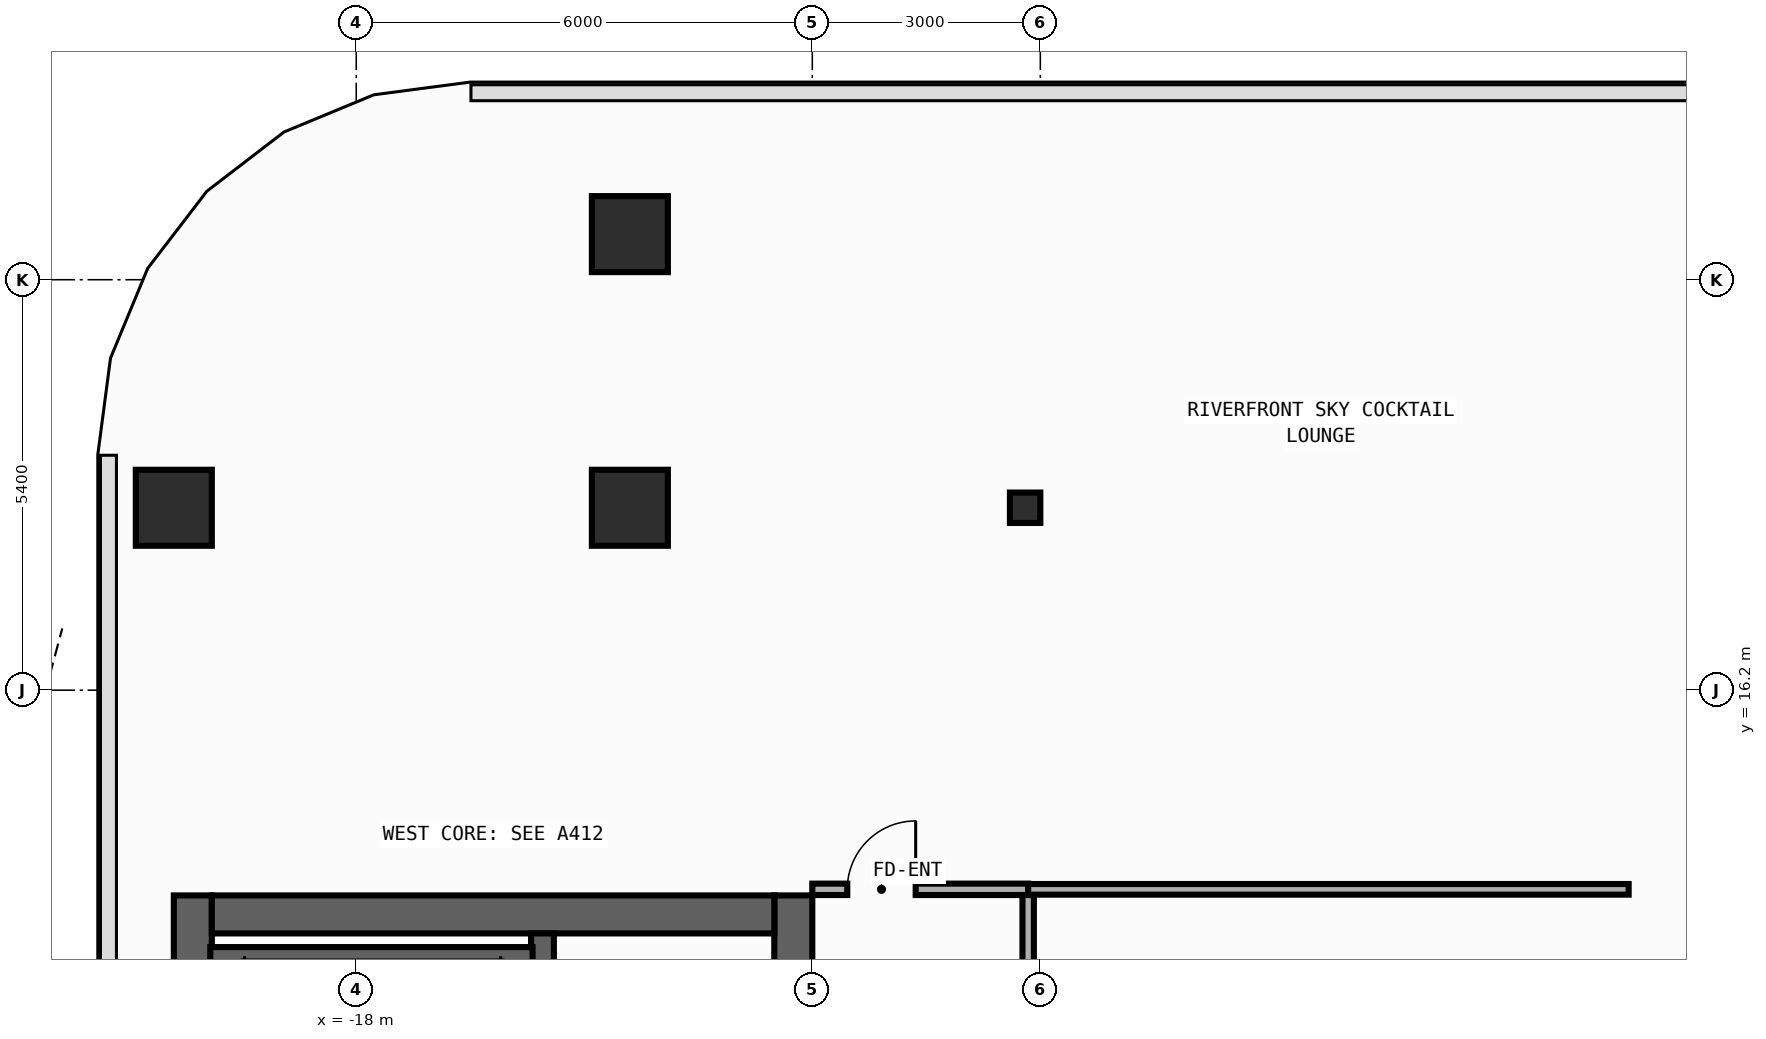
"""IFC4 building model, lengths in metres.
Left out: names, types, materials, properties, quantities, classifications, styles, units other than length and angle.
Written with IfcOpenShell. Run it as: python <this file> out.ifc"""

import sys

from ifc_helpers import new_model, si_unit, direction, frame, frame_2d, origin, origin_2d, place, context, subcontext, project, spatial, rectangle, circle, i_section, extrude, element, fill, save


model = new_model("IFC4")
c1 = context("Model", 3, precision=1e-05, world=origin(), true_north=direction((0.0, 1.0)))
c2 = subcontext(c1, "Body", "Model", "MODEL_VIEW")
j1 = project(units=[si_unit("LENGTHUNIT", "METRE"), si_unit("PLANEANGLEUNIT", "RADIAN")], contexts=[c1])
p1 = place(None, origin())
s1 = spatial("IfcSite", under=j1, at=p1, CompositionType="ELEMENT")
p2 = place(p1, origin())
s2 = spatial("IfcBuilding", under=s1, at=p2, CompositionType="ELEMENT")
p3 = place(p2, frame((0.0, 0.0, 315.6)))
s3 = spatial("IfcBuildingStorey", under=s2, at=p3, CompositionType="ELEMENT", Elevation=315.6)
p4 = place(p3, frame((-20.15, -13.5, 0.0), z_axis=(0.0, 0.0, 1.0), x_axis=(0.0, 1.0, 0.0)))
e1 = element("IfcWall", 1, at=p4, inside=s3, PredefinedType="SHEAR", context=c2, shape_type="SweptSolid", body=[
    extrude(rectangle(XDim=27.0, YDim=0.5, at=frame_2d((13.5, 0.0))), origin(), (0.0, 0.0, 1.0), 4.54),
])
p5 = place(p3, frame((-12.25, -13.5, 0.0), z_axis=(0.0, 0.0, 1.0), x_axis=(0.0, 1.0, 0.0)))
e2 = element("IfcWall", 2, at=p5, inside=s3, PredefinedType="SHEAR", context=c2, shape_type="SweptSolid", body=[
    extrude(rectangle(XDim=27.0, YDim=0.5, at=frame_2d((13.5, 0.0))), origin(), (0.0, 0.0, 1.0), 4.54),
])
p6 = place(p5, frame((15.175, 0.0, 0.0)))
e3 = element("IfcOpeningElement", 3, at=p6, cuts=e2, PredefinedType="OPENING", context=c2, shape_type="SweptSolid", body=[
    extrude(rectangle(XDim=0.85, YDim=2.1, at=frame_2d((0.425, 1.05))), frame((0.0, 0.26, 0.0), z_axis=(0.0, -1.0, 0.0), x_axis=(1.0, 0.0, 0.0)), (0.0, 0.0, 1.0), 0.52),
])
p7 = place(p5, frame((21.275, 0.0, 0.0)))
e4 = element("IfcOpeningElement", 4, at=p7, cuts=e2, PredefinedType="OPENING", context=c2, shape_type="SweptSolid", body=[
    extrude(rectangle(XDim=0.85, YDim=2.1, at=frame_2d((0.425, 1.05))), frame((0.0, 0.26, 0.0), z_axis=(0.0, -1.0, 0.0), x_axis=(1.0, 0.0, 0.0)), (0.0, 0.0, 1.0), 0.52),
])
p8 = place(p5, frame((4.275, 0.0, 0.0)))
e5 = element("IfcOpeningElement", 5, at=p8, cuts=e2, PredefinedType="OPENING", context=c2, shape_type="SweptSolid", body=[
    extrude(rectangle(XDim=0.85, YDim=2.1, at=frame_2d((0.425, 1.05))), frame((0.0, 0.26, 0.0), z_axis=(0.0, -1.0, 0.0), x_axis=(1.0, 0.0, 0.0)), (0.0, 0.0, 1.0), 0.52),
])
p9 = place(p5, frame((10.275, 0.0, 0.0)))
e6 = element("IfcOpeningElement", 6, at=p9, cuts=e2, PredefinedType="OPENING", context=c2, shape_type="SweptSolid", body=[
    extrude(rectangle(XDim=0.85, YDim=2.1, at=frame_2d((0.425, 1.05))), frame((0.0, 0.26, 0.0), z_axis=(0.0, -1.0, 0.0), x_axis=(1.0, 0.0, 0.0)), (0.0, 0.0, 1.0), 0.52),
])
p10 = place(p5, frame((12.725, 0.0, 0.0)))
e7 = element("IfcOpeningElement", 7, at=p10, cuts=e2, PredefinedType="OPENING", context=c2, shape_type="SweptSolid", body=[
    extrude(rectangle(XDim=1.15, YDim=2.2, at=frame_2d((0.575, 1.1))), frame((0.0, 0.26, 0.0), z_axis=(0.0, -1.0, 0.0), x_axis=(1.0, 0.0, 0.0)), (0.0, 0.0, 1.0), 0.52),
])
p11 = place(p5, frame((1.625, 0.0, 0.0)))
e8 = element("IfcOpeningElement", 8, at=p11, cuts=e2, PredefinedType="OPENING", context=c2, shape_type="SweptSolid", body=[
    extrude(rectangle(XDim=0.85, YDim=2.1, at=frame_2d((0.425, 1.05))), frame((0.0, 0.26, 0.0), z_axis=(0.0, -1.0, 0.0), x_axis=(1.0, 0.0, 0.0)), (0.0, 0.0, 1.0), 0.52),
])
p12 = place(p3, frame((-19.9, 13.25, 0.0), z_axis=(0.0, 0.0, 1.0), x_axis=(1.0, 0.0, 0.0)))
e9 = element("IfcWall", 9, at=p12, inside=s3, PredefinedType="SHEAR", context=c2, shape_type="SweptSolid", body=[
    extrude(rectangle(XDim=7.4, YDim=0.5, at=frame_2d((3.7, 0.0))), origin(), (0.0, 0.0, 1.0), 4.54),
])
p13 = place(p3, frame((-15.55, -13.0, 0.0), z_axis=(0.0, 0.0, 1.0), x_axis=(0.0, 1.0, 0.0)))
e10 = element("IfcWall", 10, at=p13, inside=s3, PredefinedType="SHEAR", context=c2, shape_type="SweptSolid", body=[
    extrude(rectangle(XDim=26.0, YDim=0.3, at=frame_2d((13.0, 0.0))), origin(), (0.0, 0.0, 1.0), 4.54),
])
p14 = place(p13, frame((12.225, 0.0, 0.0)))
e11 = element("IfcOpeningElement", 11, at=p14, cuts=e10, PredefinedType="OPENING", context=c2, shape_type="SweptSolid", body=[
    extrude(rectangle(XDim=1.15, YDim=2.2, at=frame_2d((0.575, 1.1))), frame((0.0, 0.16, 0.0), z_axis=(0.0, -1.0, 0.0), x_axis=(1.0, 0.0, 0.0)), (0.0, 0.0, 1.0), 0.32),
])
p15 = place(p13, frame((1.125, 0.0, 0.0)))
e12 = element("IfcOpeningElement", 12, at=p15, cuts=e10, PredefinedType="OPENING", context=c2, shape_type="SweptSolid", body=[
    extrude(rectangle(XDim=0.85, YDim=2.1, at=frame_2d((0.425, 1.05))), frame((0.0, 0.16, 0.0), z_axis=(0.0, -1.0, 0.0), x_axis=(1.0, 0.0, 0.0)), (0.0, 0.0, 1.0), 0.32),
])
for number, where, z_axis, x_axis in (
    (13, (-16.04, 1.29, 0.0), (0.0, 0.0, 1.0), (0.0, 1.0, 0.0)),
    (14, (-19.53, 1.29, 0.0), (0.0, 0.0, 1.0), (0.0, 1.0, 0.0)),
):
    element("IfcWall", number, at=place(p3, frame(where, z_axis=z_axis, x_axis=x_axis)), inside=s3, PredefinedType="SHEAR", context=c2, shape_type="SweptSolid", body=[
        extrude(rectangle(XDim=11.42, YDim=0.22, at=frame_2d((5.71, 0.0))), origin(), (0.0, 0.0, 1.0), 4.54),
    ])
p16 = place(p3, frame((-19.92, 12.71, 0.0), z_axis=(0.0, 0.0, 1.0), x_axis=(1.0, 0.0, 0.0)))
e15 = element("IfcWall", 15, at=p16, inside=s3, PredefinedType="SHEAR", context=c2, shape_type="SweptSolid", body=[
    extrude(rectangle(XDim=4.24, YDim=0.22, at=frame_2d((2.12, 0.0))), origin(), (0.0, 0.0, 1.0), 4.54),
])
p17 = place(p3, frame((-9.2, 18.6, 0.0), z_axis=(0.0, 0.0, 1.0), x_axis=(1.0, 0.0, 0.0)))
e16 = element("IfcColumn", 16, at=p17, inside=s3, PredefinedType="COLUMN", context=c2, shape_type="SweptSolid", body=[
    extrude(i_section(OverallWidth=0.4, OverallDepth=0.4, WebThickness=0.013, FlangeThickness=0.021, FilletRadius=0.022, at=origin_2d()), origin(), (0.0, 0.0, 1.0), 4.8),
])
for number, where, z_axis, x_axis in (
    (17, (-20.4, 18.6, 0.0), (0.0, 0.0, 1.0), (1.0, 0.0, 0.0)),
    (18, (-14.4, 18.6, 0.0), (0.0, 0.0, 1.0), (1.0, 0.0, 0.0)),
    (19, (-14.4, 22.2, 0.0), (0.0, 0.0, 1.0), (1.0, 0.0, 0.0)),
):
    element("IfcColumn", number, at=place(p3, frame(where, z_axis=z_axis, x_axis=x_axis)), inside=s3, PredefinedType="COLUMN", context=c2, shape_type="SweptSolid", body=[
        extrude(circle(Radius=0.5, at=origin_2d()), origin(), (0.0, 0.0, 1.0), 4.8),
    ])
p18 = place(p3, frame((-12.0, 13.58, 0.0), z_axis=(0.0, 0.0, 1.0), x_axis=(1.0, 0.0, 0.0)))
e20 = element("IfcWall", 20, at=p18, inside=s3, PredefinedType="PARTITIONING", context=c2, shape_type="SweptSolid", body=[
    extrude(rectangle(XDim=2.84, YDim=0.15, at=frame_2d((1.42, 0.0))), origin(), (0.0, 0.0, 1.0), 4.54),
])
p19 = place(p18, frame((0.46, 0.0, 0.0)))
e21 = element("IfcOpeningElement", 21, at=p19, cuts=e20, PredefinedType="OPENING", context=c2, shape_type="SweptSolid", body=[
    extrude(rectangle(XDim=0.9, YDim=2.15, at=frame_2d((0.45, 1.075))), frame((0.0, 0.085, 0.0), z_axis=(0.0, -1.0, 0.0), x_axis=(1.0, 0.0, 0.0)), (0.0, 0.0, 1.0), 0.17),
])
p20 = place(p3, frame((-9.16, 0.196, 0.0), z_axis=(0.0, 0.0, 1.0), x_axis=(0.0, 1.0, 0.0)))
e22 = element("IfcWall", 22, at=p20, inside=s3, PredefinedType="PARTITIONING", context=c2, shape_type="SweptSolid", body=[
    extrude(rectangle(XDim=13.309, YDim=0.15, at=frame_2d((6.655, 0.0))), origin(), (0.0, 0.0, 1.0), 3.64),
])
p21 = place(p20, frame((4.826, 0.0, 0.0)))
e23 = element("IfcOpeningElement", 23, at=p21, cuts=e22, PredefinedType="OPENING", context=c2, shape_type="SweptSolid", body=[
    extrude(rectangle(XDim=0.9, YDim=2.15, at=frame_2d((0.45, 1.075))), frame((0.0, 0.085, 0.0), z_axis=(0.0, -1.0, 0.0), x_axis=(1.0, 0.0, 0.0)), (0.0, 0.0, 1.0), 0.17),
])
p22 = place(p3, frame((-9.16, 13.58, 0.0), z_axis=(0.0, 0.0, 1.0), x_axis=(1.0, 0.0, 0.0)))
e24 = element("IfcWall", 24, at=p22, inside=s3, PredefinedType="PARTITIONING", context=c2, shape_type="SweptSolid", body=[
    extrude(rectangle(XDim=7.9, YDim=0.14, at=frame_2d((3.95, 0.0))), origin(), (0.0, 0.0, 1.0), 4.54),
])
p23 = place(p19, origin())
e25 = element("IfcDoor", 25, at=p23, inside=s3, OperationType="SINGLE_SWING_RIGHT", PredefinedType="DOOR", context=c2, shape_type="SweptSolid", body=[
    extrude(rectangle(XDim=0.9, YDim=2.15, at=frame_2d((0.45, 1.075))), frame((0.0, 0.025, 0.0), z_axis=(0.0, -1.0, 0.0), x_axis=(1.0, 0.0, 0.0)), (0.0, 0.0, 1.0), 0.05),
])
fill(e21, e25)
save(model, sys.argv[1])
